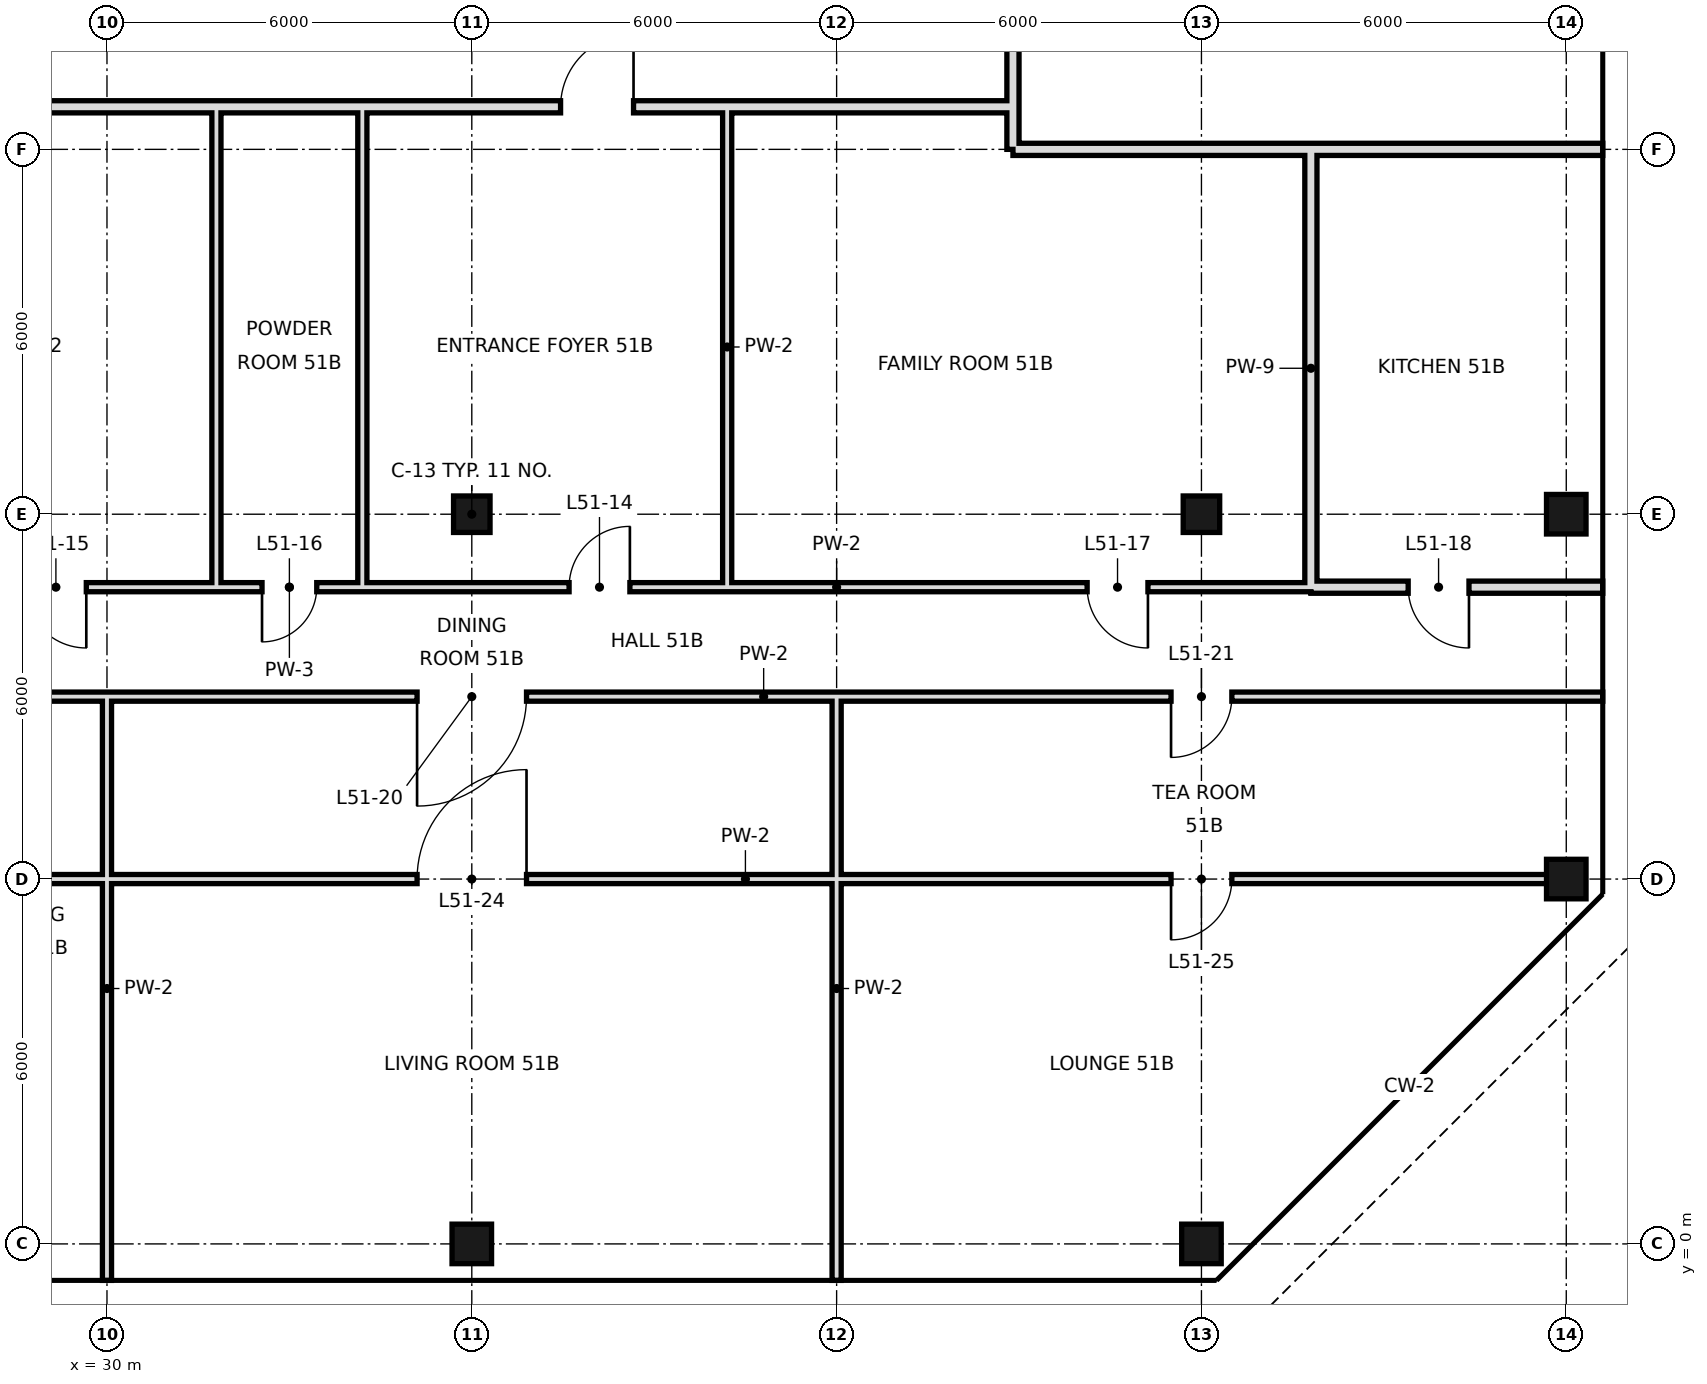
"""IFC4 building model, lengths in metres.
Left out: names, types, materials, properties, quantities, classifications, styles, units other than length and angle.
Written with IfcOpenShell. Run it as: python <this file> out.ifc"""

import sys

from ifc_helpers import new_model, si_unit, direction, frame, frame_2d, origin, origin_2d, place, context, subcontext, project, spatial, rectangle, hollow_rectangle, extrude, element, fill, save


model = new_model("IFC4")
c1 = context("Model", 3, precision=1e-05, world=origin(), true_north=direction((0.0, 1.0)))
c2 = subcontext(c1, "Body", "Model", "MODEL_VIEW")
j1 = project(units=[si_unit("LENGTHUNIT", "METRE"), si_unit("PLANEANGLEUNIT", "RADIAN")], contexts=[c1])
p1 = place(None, origin())
s1 = spatial("IfcSite", under=j1, at=p1, CompositionType="ELEMENT")
p2 = place(p1, origin())
s2 = spatial("IfcBuilding", under=s1, at=p2, CompositionType="ELEMENT")
p3 = place(p2, frame((0.0, 0.0, 219.0)))
s3 = spatial("IfcBuildingStorey", under=s2, at=p3, CompositionType="ELEMENT", Elevation=219.0)
p4 = place(p3, frame((36.0, 0.0, 0.0), z_axis=(0.0, 0.0, 1.0), x_axis=(1.0, 0.0, 0.0)))
e1 = element("IfcColumn", 1, at=p4, inside=s3, PredefinedType="COLUMN", context=c2, shape_type="SweptSolid", body=[
    extrude(hollow_rectangle(XDim=0.65, YDim=0.65, WallThickness=0.032, at=origin_2d()), origin(), (0.0, 0.0, 1.0), 3.6),
])
p5 = place(p3, frame((36.0, 12.0, 0.0), z_axis=(0.0, 0.0, 1.0), x_axis=(1.0, 0.0, 0.0)))
e2 = element("IfcColumn", 2, at=p5, inside=s3, PredefinedType="COLUMN", context=c2, shape_type="SweptSolid", body=[
    extrude(hollow_rectangle(XDim=0.6, YDim=0.6, WallThickness=0.028, at=origin_2d()), origin(), (0.0, 0.0, 1.0), 3.6),
])
p6 = place(p3, frame((48.0, 0.0, 0.0), z_axis=(0.0, 0.0, 1.0), x_axis=(1.0, 0.0, 0.0)))
e3 = element("IfcColumn", 3, at=p6, inside=s3, PredefinedType="COLUMN", context=c2, shape_type="SweptSolid", body=[
    extrude(hollow_rectangle(XDim=0.65, YDim=0.65, WallThickness=0.032, at=origin_2d()), origin(), (0.0, 0.0, 1.0), 3.6),
])
p7 = place(p3, frame((48.0, 12.0, 0.0), z_axis=(0.0, 0.0, 1.0), x_axis=(1.0, 0.0, 0.0)))
e4 = element("IfcColumn", 4, at=p7, inside=s3, PredefinedType="COLUMN", context=c2, shape_type="SweptSolid", body=[
    extrude(hollow_rectangle(XDim=0.6, YDim=0.6, WallThickness=0.028, at=origin_2d()), origin(), (0.0, 0.0, 1.0), 3.6),
])
for number, where, z_axis, x_axis in (
    (5, (54.0, 6.0, 0.0), (0.0, 0.0, 1.0), (1.0, 0.0, 0.0)),
    (6, (54.0, 12.0, 0.0), (0.0, 0.0, 1.0), (1.0, 0.0, 0.0)),
):
    element("IfcColumn", number, at=place(p3, frame(where, z_axis=z_axis, x_axis=x_axis)), inside=s3, PredefinedType="COLUMN", context=c2, shape_type="SweptSolid", body=[
        extrude(hollow_rectangle(XDim=0.65, YDim=0.65, WallThickness=0.032, at=origin_2d()), origin(), (0.0, 0.0, 1.0), 3.6),
    ])
p8 = place(p3, frame((30.0, -0.6, 0.0), z_axis=(0.0, 0.0, 1.0), x_axis=(0.0, 1.0, 0.0)))
e7 = element("IfcWall", 7, at=p8, inside=s3, PredefinedType="PARTITIONING", context=c2, shape_type="SweptSolid", body=[
    extrude(rectangle(XDim=9.6, YDim=0.15, at=frame_2d((4.8, 0.0))), origin(), (0.0, 0.0, 1.0), 2.72),
])
for number, where, z_axis, x_axis in (
    (8, (31.8, 10.8, 0.0), (0.0, 0.0, 1.0), (0.0, 1.0, 0.0)),
    (9, (34.2, 10.8, 0.0), (0.0, 0.0, 1.0), (0.0, 1.0, 0.0)),
    (10, (40.2, 10.8, 0.0), (0.0, 0.0, 1.0), (0.0, 1.0, 0.0)),
):
    element("IfcWall", number, at=place(p3, frame(where, z_axis=z_axis, x_axis=x_axis)), inside=s3, PredefinedType="PARTITIONING", context=c2, shape_type="SweptSolid", body=[
        extrude(rectangle(XDim=7.9, YDim=0.15, at=frame_2d((3.95, 0.0))), origin(), (0.0, 0.0, 1.0), 3.42),
    ])
p9 = place(p3, frame((42.0, -0.6, 0.0), z_axis=(0.0, 0.0, 1.0), x_axis=(0.0, 1.0, 0.0)))
e11 = element("IfcWall", 11, at=p9, inside=s3, PredefinedType="PARTITIONING", context=c2, shape_type="SweptSolid", body=[
    extrude(rectangle(XDim=9.6, YDim=0.15, at=frame_2d((4.8, 0.0))), origin(), (0.0, 0.0, 1.0), 2.72),
])
p10 = place(p3, frame((44.9, 18.0, 0.0), z_axis=(0.0, 0.0, 1.0), x_axis=(0.0, 1.0, 0.0)))
e12 = element("IfcWall", 12, at=p10, inside=s3, PredefinedType="SOLIDWALL", context=c2, shape_type="SweptSolid", body=[
    extrude(rectangle(XDim=30.6, YDim=0.2, at=frame_2d((15.3, 0.0))), origin(), (0.0, 0.0, 1.0), 2.72),
])
p11 = place(p10, frame((14.75, 0.0, 0.0)))
e13 = element("IfcOpeningElement", 13, at=p11, cuts=e12, PredefinedType="OPENING", context=c2, shape_type="SweptSolid", body=[
    extrude(rectangle(XDim=1.2, YDim=2.4, at=frame_2d((0.6, 1.2))), frame((0.0, 0.11, 0.0), z_axis=(0.0, -1.0, 0.0), x_axis=(1.0, 0.0, 0.0)), (0.0, 0.0, 1.0), 0.22),
])
p12 = place(p3, frame((49.8, 10.8, 0.0), z_axis=(0.0, 0.0, 1.0), x_axis=(0.0, 1.0, 0.0)))
e14 = element("IfcWall", 14, at=p12, inside=s3, PredefinedType="SOLIDWALL", context=c2, shape_type="SweptSolid", body=[
    extrude(rectangle(XDim=7.2, YDim=0.2, at=frame_2d((3.6, 0.0))), origin(), (0.0, 0.0, 1.0), 2.97),
])
p13 = place(p3, frame((49.8, 10.8, 0.0), z_axis=(0.0, 0.0, 1.0), x_axis=(1.0, 0.0, 0.0)))
e15 = element("IfcWall", 15, at=p13, inside=s3, PredefinedType="SOLIDWALL", context=c2, shape_type="SweptSolid", body=[
    extrude(rectangle(XDim=4.8, YDim=0.2, at=frame_2d((2.4, 0.0))), origin(), (0.0, 0.0, 1.0), 2.97),
])
p14 = place(p13, frame((1.6, 0.0, 0.0)))
e16 = element("IfcOpeningElement", 16, at=p14, cuts=e15, PredefinedType="OPENING", context=c2, shape_type="SweptSolid", body=[
    extrude(rectangle(XDim=1.0, YDim=2.4, at=frame_2d((0.5, 1.2))), frame((0.0, 0.11, 0.0), z_axis=(0.0, -1.0, 0.0), x_axis=(1.0, 0.0, 0.0)), (0.0, 0.0, 1.0), 0.22),
])
p15 = place(p3, frame((7.2, 10.8, 0.0), z_axis=(0.0, 0.0, 1.0), x_axis=(1.0, 0.0, 0.0)))
e17 = element("IfcWall", 17, at=p15, inside=s3, PredefinedType="PARTITIONING", context=c2, shape_type="SweptSolid", body=[
    extrude(rectangle(XDim=24.6, YDim=0.15, at=frame_2d((12.3, 0.0))), origin(), (0.0, 0.0, 1.0), 3.42),
])
p16 = place(p15, frame((1.6, 0.0, 0.0)))
e18 = element("IfcOpeningElement", 18, at=p16, cuts=e17, PredefinedType="OPENING", context=c2, shape_type="SweptSolid", body=[
    extrude(rectangle(XDim=1.0, YDim=2.4, at=frame_2d((0.5, 1.2))), frame((0.0, 0.085, 0.0), z_axis=(0.0, -1.0, 0.0), x_axis=(1.0, 0.0, 0.0)), (0.0, 0.0, 1.0), 0.17),
])
p17 = place(p15, frame((9.04, 0.0, 0.0)))
e19 = element("IfcOpeningElement", 19, at=p17, cuts=e17, PredefinedType="OPENING", context=c2, shape_type="SweptSolid", body=[
    extrude(rectangle(XDim=1.0, YDim=2.4, at=frame_2d((0.5, 1.2))), frame((0.0, 0.085, 0.0), z_axis=(0.0, -1.0, 0.0), x_axis=(1.0, 0.0, 0.0)), (0.0, 0.0, 1.0), 0.17),
])
p18 = place(p15, frame((21.46, 0.0, 0.0)))
e20 = element("IfcOpeningElement", 20, at=p18, cuts=e17, PredefinedType="OPENING", context=c2, shape_type="SweptSolid", body=[
    extrude(rectangle(XDim=1.0, YDim=2.4, at=frame_2d((0.5, 1.2))), frame((0.0, 0.085, 0.0), z_axis=(0.0, -1.0, 0.0), x_axis=(1.0, 0.0, 0.0)), (0.0, 0.0, 1.0), 0.17),
])
p19 = place(p3, frame((34.2, 10.8, 0.0), z_axis=(0.0, 0.0, 1.0), x_axis=(1.0, 0.0, 0.0)))
e21 = element("IfcWall", 21, at=p19, inside=s3, PredefinedType="PARTITIONING", context=c2, shape_type="SweptSolid", body=[
    extrude(rectangle(XDim=15.6, YDim=0.15, at=frame_2d((7.8, 0.0))), origin(), (0.0, 0.0, 1.0), 3.42),
])
p20 = place(p19, frame((3.4, 0.0, 0.0)))
e22 = element("IfcOpeningElement", 22, at=p20, cuts=e21, PredefinedType="OPENING", context=c2, shape_type="SweptSolid", body=[
    extrude(rectangle(XDim=1.0, YDim=2.4, at=frame_2d((0.5, 1.2))), frame((0.0, 0.085, 0.0), z_axis=(0.0, -1.0, 0.0), x_axis=(1.0, 0.0, 0.0)), (0.0, 0.0, 1.0), 0.17),
])
p21 = place(p19, frame((11.92, 0.0, 0.0)))
e23 = element("IfcOpeningElement", 23, at=p21, cuts=e21, PredefinedType="OPENING", context=c2, shape_type="SweptSolid", body=[
    extrude(rectangle(XDim=1.0, YDim=2.4, at=frame_2d((0.5, 1.2))), frame((0.0, 0.085, 0.0), z_axis=(0.0, -1.0, 0.0), x_axis=(1.0, 0.0, 0.0)), (0.0, 0.0, 1.0), 0.17),
])
p22 = place(p3, frame((31.8, 10.8, 0.0), z_axis=(0.0, 0.0, 1.0), x_axis=(1.0, 0.0, 0.0)))
e24 = element("IfcWall", 24, at=p22, inside=s3, PredefinedType="PARTITIONING", context=c2, shape_type="SweptSolid", body=[
    extrude(rectangle(XDim=2.4, YDim=0.15, at=frame_2d((1.2, 0.0))), origin(), (0.0, 0.0, 1.0), 3.42),
])
p23 = place(p22, frame((0.75, 0.0, 0.0)))
e25 = element("IfcOpeningElement", 25, at=p23, cuts=e24, PredefinedType="OPENING", context=c2, shape_type="SweptSolid", body=[
    extrude(rectangle(XDim=0.9, YDim=2.4, at=frame_2d((0.45, 1.2))), frame((0.0, 0.085, 0.0), z_axis=(0.0, -1.0, 0.0), x_axis=(1.0, 0.0, 0.0)), (0.0, 0.0, 1.0), 0.17),
])
p24 = place(p3, frame((44.9, 18.0, 0.0), z_axis=(0.0, 0.0, 1.0), x_axis=(1.0, 0.0, 0.0)))
e26 = element("IfcWall", 26, at=p24, inside=s3, PredefinedType="SOLIDWALL", context=c2, shape_type="SweptSolid", body=[
    extrude(rectangle(XDim=4.9, YDim=0.2, at=frame_2d((2.45, 0.0))), origin(), (0.0, 0.0, 1.0), 2.72),
])
p25 = place(p3, frame((49.8, 18.0, 0.0), z_axis=(0.0, 0.0, 1.0), x_axis=(1.0, 0.0, 0.0)))
e27 = element("IfcWall", 27, at=p25, inside=s3, PredefinedType="SOLIDWALL", context=c2, shape_type="SweptSolid", body=[
    extrude(rectangle(XDim=4.8, YDim=0.2, at=frame_2d((2.4, 0.0))), origin(), (0.0, 0.0, 1.0), 2.72),
])
p26 = place(p3, frame((7.2, 18.7, 0.0), z_axis=(0.0, 0.0, 1.0), x_axis=(1.0, 0.0, 0.0)))
e28 = element("IfcWall", 28, at=p26, inside=s3, PredefinedType="SOLIDWALL", context=c2, shape_type="SweptSolid", body=[
    extrude(rectangle(XDim=37.7, YDim=0.2, at=frame_2d((18.85, 0.0))), origin(), (0.0, 0.0, 1.0), 2.72),
])
p27 = place(p26, frame((1.54, 0.0, 0.0)))
e29 = element("IfcOpeningElement", 29, at=p27, cuts=e28, PredefinedType="OPENING", context=c2, shape_type="SweptSolid", body=[
    extrude(rectangle(XDim=1.2, YDim=2.4, at=frame_2d((0.6, 1.2))), frame((0.0, 0.11, 0.0), z_axis=(0.0, -1.0, 0.0), x_axis=(1.0, 0.0, 0.0)), (0.0, 0.0, 1.0), 0.22),
])
p28 = place(p26, frame((30.26, 0.0, 0.0)))
e30 = element("IfcOpeningElement", 30, at=p28, cuts=e28, PredefinedType="OPENING", context=c2, shape_type="SweptSolid", body=[
    extrude(rectangle(XDim=1.2, YDim=2.4, at=frame_2d((0.6, 1.2))), frame((0.0, 0.11, 0.0), z_axis=(0.0, -1.0, 0.0), x_axis=(1.0, 0.0, 0.0)), (0.0, 0.0, 1.0), 0.22),
])
p29 = place(p3, frame((27.0, 6.0, 0.0), z_axis=(0.0, 0.0, 1.0), x_axis=(1.0, 0.0, 0.0)))
e31 = element("IfcWall", 31, at=p29, inside=s3, PredefinedType="PARTITIONING", context=c2, shape_type="SweptSolid", body=[
    extrude(rectangle(XDim=27.0, YDim=0.15, at=frame_2d((13.5, 0.0))), origin(), (0.0, 0.0, 1.0), 2.97),
])
p30 = place(p29, frame((0.7, 0.0, 0.0)))
e32 = element("IfcOpeningElement", 32, at=p30, cuts=e31, PredefinedType="OPENING", context=c2, shape_type="SweptSolid", body=[
    extrude(rectangle(XDim=1.0, YDim=2.4, at=frame_2d((0.5, 1.2))), frame((0.0, 0.085, 0.0), z_axis=(0.0, -1.0, 0.0), x_axis=(1.0, 0.0, 0.0)), (0.0, 0.0, 1.0), 0.17),
])
p31 = place(p29, frame((8.1, 0.0, 0.0)))
e33 = element("IfcOpeningElement", 33, at=p31, cuts=e31, PredefinedType="OPENING", context=c2, shape_type="SweptSolid", body=[
    extrude(rectangle(XDim=1.8, YDim=2.4, at=frame_2d((0.9, 1.2))), frame((0.0, 0.085, 0.0), z_axis=(0.0, -1.0, 0.0), x_axis=(1.0, 0.0, 0.0)), (0.0, 0.0, 1.0), 0.17),
])
p32 = place(p29, frame((20.5, 0.0, 0.0)))
e34 = element("IfcOpeningElement", 34, at=p32, cuts=e31, PredefinedType="OPENING", context=c2, shape_type="SweptSolid", body=[
    extrude(rectangle(XDim=1.0, YDim=2.4, at=frame_2d((0.5, 1.2))), frame((0.0, 0.085, 0.0), z_axis=(0.0, -1.0, 0.0), x_axis=(1.0, 0.0, 0.0)), (0.0, 0.0, 1.0), 0.17),
])
p33 = place(p3, frame((27.0, 9.0, 0.0), z_axis=(0.0, 0.0, 1.0), x_axis=(1.0, 0.0, 0.0)))
e35 = element("IfcWall", 35, at=p33, inside=s3, PredefinedType="PARTITIONING", context=c2, shape_type="SweptSolid", body=[
    extrude(rectangle(XDim=27.6, YDim=0.15, at=frame_2d((13.8, 0.0))), origin(), (0.0, 0.0, 1.0), 3.42),
])
p34 = place(p33, frame((1.0, 0.0, 0.0)))
e36 = element("IfcOpeningElement", 36, at=p34, cuts=e35, PredefinedType="OPENING", context=c2, shape_type="SweptSolid", body=[
    extrude(rectangle(XDim=1.0, YDim=2.4, at=frame_2d((0.5, 1.2))), frame((0.0, 0.085, 0.0), z_axis=(0.0, -1.0, 0.0), x_axis=(1.0, 0.0, 0.0)), (0.0, 0.0, 1.0), 0.17),
])
p35 = place(p33, frame((8.1, 0.0, 0.0)))
e37 = element("IfcOpeningElement", 37, at=p35, cuts=e35, PredefinedType="OPENING", context=c2, shape_type="SweptSolid", body=[
    extrude(rectangle(XDim=1.8, YDim=2.4, at=frame_2d((0.9, 1.2))), frame((0.0, 0.085, 0.0), z_axis=(0.0, -1.0, 0.0), x_axis=(1.0, 0.0, 0.0)), (0.0, 0.0, 1.0), 0.17),
])
p36 = place(p33, frame((20.5, 0.0, 0.0)))
e38 = element("IfcOpeningElement", 38, at=p36, cuts=e35, PredefinedType="OPENING", context=c2, shape_type="SweptSolid", body=[
    extrude(rectangle(XDim=1.0, YDim=2.4, at=frame_2d((0.5, 1.2))), frame((0.0, 0.085, 0.0), z_axis=(0.0, -1.0, 0.0), x_axis=(1.0, 0.0, 0.0)), (0.0, 0.0, 1.0), 0.17),
])
p37 = place(p20, frame((1.0, 0.0, 0.0), z_axis=(0.0, 0.0, 1.0), x_axis=(-1.0, 0.0, 0.0)))
e39 = element("IfcDoor", 39, at=p37, inside=s3, OperationType="SINGLE_SWING_LEFT", PredefinedType="DOOR", context=c2, shape_type="SweptSolid", body=[
    extrude(rectangle(XDim=1.0, YDim=2.4, at=frame_2d((0.5, 1.2))), frame((0.0, 0.025, 0.0), z_axis=(0.0, -1.0, 0.0), x_axis=(1.0, 0.0, 0.0)), (0.0, 0.0, 1.0), 0.05),
])
fill(e22, e39)
p38 = place(p18, origin())
e40 = element("IfcDoor", 40, at=p38, inside=s3, OperationType="SINGLE_SWING_RIGHT", PredefinedType="DOOR", context=c2, shape_type="SweptSolid", body=[
    extrude(rectangle(XDim=1.0, YDim=2.4, at=frame_2d((0.5, 1.2))), frame((0.0, 0.025, 0.0), z_axis=(0.0, -1.0, 0.0), x_axis=(1.0, 0.0, 0.0)), (0.0, 0.0, 1.0), 0.05),
])
fill(e20, e40)
p39 = place(p23, frame((0.9, 0.0, 0.0), z_axis=(0.0, 0.0, 1.0), x_axis=(-1.0, 0.0, 0.0)))
e41 = element("IfcDoor", 41, at=p39, inside=s3, OperationType="SINGLE_SWING_RIGHT", PredefinedType="DOOR", context=c2, shape_type="SweptSolid", body=[
    extrude(rectangle(XDim=0.9, YDim=2.4, at=frame_2d((0.45, 1.2))), frame((0.0, 0.025, 0.0), z_axis=(0.0, -1.0, 0.0), x_axis=(1.0, 0.0, 0.0)), (0.0, 0.0, 1.0), 0.05),
])
fill(e25, e41)
p40 = place(p21, origin())
e42 = element("IfcDoor", 42, at=p40, inside=s3, OperationType="SINGLE_SWING_RIGHT", PredefinedType="DOOR", context=c2, shape_type="SweptSolid", body=[
    extrude(rectangle(XDim=1.0, YDim=2.4, at=frame_2d((0.5, 1.2))), frame((0.0, 0.025, 0.0), z_axis=(0.0, -1.0, 0.0), x_axis=(1.0, 0.0, 0.0)), (0.0, 0.0, 1.0), 0.05),
])
fill(e23, e42)
p41 = place(p14, origin())
e43 = element("IfcDoor", 43, at=p41, inside=s3, OperationType="SINGLE_SWING_RIGHT", PredefinedType="DOOR", context=c2, shape_type="SweptSolid", body=[
    extrude(rectangle(XDim=1.0, YDim=2.4, at=frame_2d((0.5, 1.2))), frame((0.0, 0.025, 0.0), z_axis=(0.0, -1.0, 0.0), x_axis=(1.0, 0.0, 0.0)), (0.0, 0.0, 1.0), 0.05),
])
fill(e16, e43)
p42 = place(p35, frame((1.8, 0.0, 0.0), z_axis=(0.0, 0.0, 1.0), x_axis=(-1.0, 0.0, 0.0)))
e44 = element("IfcDoor", 44, at=p42, inside=s3, OperationType="SINGLE_SWING_RIGHT", PredefinedType="DOOR", context=c2, shape_type="SweptSolid", body=[
    extrude(rectangle(XDim=1.8, YDim=2.4, at=frame_2d((0.9, 1.2))), frame((0.0, 0.025, 0.0), z_axis=(0.0, -1.0, 0.0), x_axis=(1.0, 0.0, 0.0)), (0.0, 0.0, 1.0), 0.05),
])
fill(e37, e44)
p43 = place(p36, frame((1.0, 0.0, 0.0), z_axis=(0.0, 0.0, 1.0), x_axis=(-1.0, 0.0, 0.0)))
e45 = element("IfcDoor", 45, at=p43, inside=s3, OperationType="SINGLE_SWING_RIGHT", PredefinedType="DOOR", context=c2, shape_type="SweptSolid", body=[
    extrude(rectangle(XDim=1.0, YDim=2.4, at=frame_2d((0.5, 1.2))), frame((0.0, 0.025, 0.0), z_axis=(0.0, -1.0, 0.0), x_axis=(1.0, 0.0, 0.0)), (0.0, 0.0, 1.0), 0.05),
])
fill(e38, e45)
p44 = place(p31, frame((1.8, 0.0, 0.0), z_axis=(0.0, 0.0, 1.0), x_axis=(-1.0, 0.0, 0.0)))
e46 = element("IfcDoor", 46, at=p44, inside=s3, OperationType="SINGLE_SWING_LEFT", PredefinedType="DOOR", context=c2, shape_type="SweptSolid", body=[
    extrude(rectangle(XDim=1.8, YDim=2.4, at=frame_2d((0.9, 1.2))), frame((0.0, 0.025, 0.0), z_axis=(0.0, -1.0, 0.0), x_axis=(1.0, 0.0, 0.0)), (0.0, 0.0, 1.0), 0.05),
])
fill(e33, e46)
p45 = place(p32, frame((1.0, 0.0, 0.0), z_axis=(0.0, 0.0, 1.0), x_axis=(-1.0, 0.0, 0.0)))
e47 = element("IfcDoor", 47, at=p45, inside=s3, OperationType="SINGLE_SWING_RIGHT", PredefinedType="DOOR", context=c2, shape_type="SweptSolid", body=[
    extrude(rectangle(XDim=1.0, YDim=2.4, at=frame_2d((0.5, 1.2))), frame((0.0, 0.025, 0.0), z_axis=(0.0, -1.0, 0.0), x_axis=(1.0, 0.0, 0.0)), (0.0, 0.0, 1.0), 0.05),
])
fill(e34, e47)
p46 = place(p28, frame((1.2, 0.0, 0.0), z_axis=(0.0, 0.0, 1.0), x_axis=(-1.0, 0.0, 0.0)))
e48 = element("IfcDoor", 48, at=p46, inside=s3, OperationType="SINGLE_SWING_LEFT", PredefinedType="DOOR", context=c2, shape_type="SweptSolid", body=[
    extrude(rectangle(XDim=1.2, YDim=2.4, at=frame_2d((0.6, 1.2))), frame((0.0, 0.025, 0.0), z_axis=(0.0, -1.0, 0.0), x_axis=(1.0, 0.0, 0.0)), (0.0, 0.0, 1.0), 0.05),
])
fill(e30, e48)
save(model, sys.argv[1])
